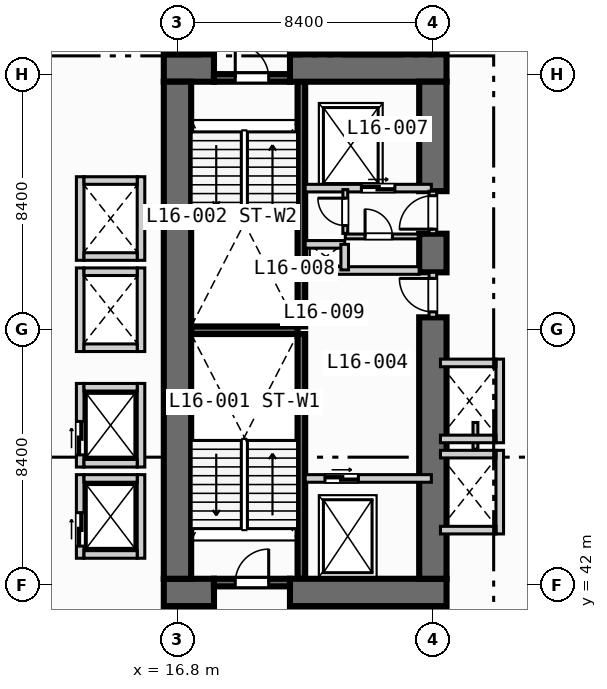
"""IFC4 building model, lengths in metres.
Left out: names, types, materials, properties, quantities, classifications, styles, units other than length and angle.
Written with IfcOpenShell. Run it as: python <this file> out.ifc"""

import sys

from ifc_helpers import new_model, si_unit, direction, frame, frame_2d, origin, place, context, subcontext, project, spatial, rectangle, extrude, element, fill, save


model = new_model("IFC4")
c1 = context("Model", 3, precision=1e-05, world=origin(), true_north=direction((0.0, 1.0)))
c2 = subcontext(c1, "Body", "Model", "MODEL_VIEW")
j1 = project(units=[si_unit("LENGTHUNIT", "METRE"), si_unit("PLANEANGLEUNIT", "RADIAN")], contexts=[c1])
p1 = place(None, origin())
s1 = spatial("IfcSite", under=j1, at=p1, CompositionType="ELEMENT")
p2 = place(p1, origin())
s2 = spatial("IfcBuilding", under=s1, at=p2, CompositionType="ELEMENT")
p3 = place(p2, frame((0.0, 0.0, 70.0)))
s3 = spatial("IfcBuildingStorey", under=s2, at=p3, CompositionType="ELEMENT", Elevation=70.0)
for number, where, z_axis, x_axis in (
    (1, (20.875, 42.2, 0.0), (0.0, 0.0, 1.0), (0.0, 1.0, 0.0)),
    (2, (20.875, 50.5, 0.0), (0.0, 0.0, 1.0), (0.0, 1.0, 0.0)),
):
    element("IfcWall", number, at=place(p3, frame(where, z_axis=z_axis, x_axis=x_axis)), inside=s3, PredefinedType="SOLIDWALL", context=c2, shape_type="SweptSolid", body=[
        extrude(rectangle(XDim=8.05, YDim=0.25, at=frame_2d((4.025, 0.0))), origin(), (0.0, 0.0, 1.0), 3.55),
    ])
p4 = place(p3, frame((17.25, 50.375, 0.0), z_axis=(0.0, 0.0, 1.0), x_axis=(1.0, 0.0, 0.0)))
e3 = element("IfcWall", 3, at=p4, inside=s3, PredefinedType="SOLIDWALL", context=c2, shape_type="SweptSolid", body=[
    extrude(rectangle(XDim=3.5, YDim=0.25, at=frame_2d((1.75, 0.0))), origin(), (0.0, 0.0, 1.0), 3.55),
])
p5 = place(p3, frame((16.35, 41.75, 0.0), z_axis=(0.0, 0.0, 1.0), x_axis=(1.0, 0.0, 0.0)))
e4 = element("IfcWall", 4, at=p5, inside=s3, PredefinedType="SHEAR", context=c2, shape_type="SweptSolid", body=[
    extrude(rectangle(XDim=1.65, YDim=0.9, at=frame_2d((0.825, 0.0))), origin(), (0.0, 0.0, 1.0), 3.55),
])
p6 = place(p3, frame((20.5, 41.75, 0.0), z_axis=(0.0, 0.0, 1.0), x_axis=(1.0, 0.0, 0.0)))
e5 = element("IfcWall", 5, at=p6, inside=s3, PredefinedType="SHEAR", context=c2, shape_type="SweptSolid", body=[
    extrude(rectangle(XDim=5.15, YDim=0.9, at=frame_2d((2.575, 0.0))), origin(), (0.0, 0.0, 1.0), 3.55),
])
p7 = place(p3, frame((16.35, 59.0, 0.0), z_axis=(0.0, 0.0, 1.0), x_axis=(1.0, 0.0, 0.0)))
e6 = element("IfcWall", 6, at=p7, inside=s3, PredefinedType="SHEAR", context=c2, shape_type="SweptSolid", body=[
    extrude(rectangle(XDim=1.65, YDim=0.9, at=frame_2d((0.825, 0.0))), origin(), (0.0, 0.0, 1.0), 3.55),
])
p8 = place(p3, frame((20.5, 59.0, 0.0), z_axis=(0.0, 0.0, 1.0), x_axis=(1.0, 0.0, 0.0)))
e7 = element("IfcWall", 7, at=p8, inside=s3, PredefinedType="SHEAR", context=c2, shape_type="SweptSolid", body=[
    extrude(rectangle(XDim=5.15, YDim=0.9, at=frame_2d((2.575, 0.0))), origin(), (0.0, 0.0, 1.0), 3.55),
])
p9 = place(p3, frame((16.8, 42.2, 0.0), z_axis=(0.0, 0.0, 1.0), x_axis=(0.0, 1.0, 0.0)))
e8 = element("IfcWall", 8, at=p9, inside=s3, PredefinedType="SHEAR", context=c2, shape_type="SweptSolid", body=[
    extrude(rectangle(XDim=16.35, YDim=0.9, at=frame_2d((8.175, 0.0))), origin(), (0.0, 0.0, 1.0), 3.55),
])
p10 = place(p3, frame((25.2, 42.2, 0.0), z_axis=(0.0, 0.0, 1.0), x_axis=(0.0, 1.0, 0.0)))
e9 = element("IfcWall", 9, at=p10, inside=s3, PredefinedType="SHEAR", context=c2, shape_type="SweptSolid", body=[
    extrude(rectangle(XDim=8.6, YDim=0.9, at=frame_2d((4.3, 0.0))), origin(), (0.0, 0.0, 1.0), 3.55),
])
p11 = place(p3, frame((25.2, 52.28, 0.0), z_axis=(0.0, 0.0, 1.0), x_axis=(0.0, 1.0, 0.0)))
e10 = element("IfcWall", 10, at=p11, inside=s3, PredefinedType="SHEAR", context=c2, shape_type="SweptSolid", body=[
    extrude(rectangle(XDim=1.27, YDim=0.9, at=frame_2d((0.635, 0.0))), origin(), (0.0, 0.0, 1.0), 3.55),
])
p12 = place(p3, frame((25.2, 54.95, 0.0), z_axis=(0.0, 0.0, 1.0), x_axis=(0.0, 1.0, 0.0)))
e11 = element("IfcWall", 11, at=p12, inside=s3, PredefinedType="SHEAR", context=c2, shape_type="SweptSolid", body=[
    extrude(rectangle(XDim=3.6, YDim=0.9, at=frame_2d((1.8, 0.0))), origin(), (0.0, 0.0, 1.0), 3.55),
])
p13 = place(p3, frame((18.0, 42.075, 0.0), z_axis=(0.0, 0.0, 1.0), x_axis=(1.0, 0.0, 0.0)))
e12 = element("IfcWall", 12, at=p13, inside=s3, PredefinedType="SOLIDWALL", context=c2, shape_type="SweptSolid", body=[
    extrude(rectangle(XDim=2.5, YDim=0.25, at=frame_2d((1.25, 0.0))), origin(), (0.0, 0.0, 1.0), 3.55),
])
p14 = place(p13, frame((0.7, 0.0, 0.0)))
e13 = element("IfcOpeningElement", 13, at=p14, cuts=e12, PredefinedType="OPENING", context=c2, shape_type="SweptSolid", body=[
    extrude(rectangle(XDim=1.1, YDim=2.15, at=frame_2d((0.55, 1.075))), frame((0.0, 0.135, 0.0), z_axis=(0.0, -1.0, 0.0), x_axis=(1.0, 0.0, 0.0)), (0.0, 0.0, 1.0), 0.27),
])
p15 = place(p3, frame((18.0, 58.675, 0.0), z_axis=(0.0, 0.0, 1.0), x_axis=(1.0, 0.0, 0.0)))
e14 = element("IfcWall", 14, at=p15, inside=s3, PredefinedType="SOLIDWALL", context=c2, shape_type="SweptSolid", body=[
    extrude(rectangle(XDim=2.5, YDim=0.25, at=frame_2d((1.25, 0.0))), origin(), (0.0, 0.0, 1.0), 3.55),
])
p16 = place(p15, frame((0.7, 0.0, 0.0)))
e15 = element("IfcOpeningElement", 15, at=p16, cuts=e14, PredefinedType="OPENING", context=c2, shape_type="SweptSolid", body=[
    extrude(rectangle(XDim=1.1, YDim=2.15, at=frame_2d((0.55, 1.075))), frame((0.0, 0.135, 0.0), z_axis=(0.0, -1.0, 0.0), x_axis=(1.0, 0.0, 0.0)), (0.0, 0.0, 1.0), 0.27),
])
p17 = place(p3, frame((21.0, 45.5, 0.0), z_axis=(0.0, 0.0, 1.0), x_axis=(1.0, 0.0, 0.0)))
e16 = element("IfcWall", 16, at=p17, inside=s3, PredefinedType="SOLIDWALL", context=c2, shape_type="SweptSolid", body=[
    extrude(rectangle(XDim=4.15, YDim=0.25, at=frame_2d((2.075, 0.0))), origin(), (0.0, 0.0, 1.0), 3.55),
])
p18 = place(p17, frame((0.65, 0.0, 0.0)))
e17 = element("IfcOpeningElement", 17, at=p18, cuts=e16, PredefinedType="OPENING", context=c2, shape_type="SweptSolid", body=[
    extrude(rectangle(XDim=1.1, YDim=2.15, at=frame_2d((0.55, 1.075))), frame((0.0, 0.135, 0.0), z_axis=(0.0, -1.0, 0.0), x_axis=(1.0, 0.0, 0.0)), (0.0, 0.0, 1.0), 0.27),
])
p19 = place(p3, frame((25.2, 50.8, 0.0), z_axis=(0.0, 0.0, 1.0), x_axis=(0.0, 1.0, 0.0)))
e18 = element("IfcWall", 18, at=p19, inside=s3, PredefinedType="SOLIDWALL", context=c2, shape_type="SweptSolid", body=[
    extrude(rectangle(XDim=1.48, YDim=0.25, at=frame_2d((0.74, 0.0))), origin(), (0.0, 0.0, 1.0), 3.55),
])
p20 = place(p19, frame((0.18, 0.0, 0.0)))
e19 = element("IfcOpeningElement", 19, at=p20, cuts=e18, PredefinedType="OPENING", context=c2, shape_type="SweptSolid", body=[
    extrude(rectangle(XDim=1.1, YDim=2.15, at=frame_2d((0.55, 1.075))), frame((0.0, 0.135, 0.0), z_axis=(0.0, -1.0, 0.0), x_axis=(1.0, 0.0, 0.0)), (0.0, 0.0, 1.0), 0.27),
])
p21 = place(p3, frame((21.0, 52.34, 0.0), z_axis=(0.0, 0.0, 1.0), x_axis=(1.0, 0.0, 0.0)))
e20 = element("IfcWall", 20, at=p21, inside=s3, PredefinedType="SOLIDWALL", context=c2, shape_type="SweptSolid", body=[
    extrude(rectangle(XDim=3.75, YDim=0.25, at=frame_2d((1.875, 0.0))), origin(), (0.0, 0.0, 1.0), 3.55),
])
p22 = place(p3, frame((21.0, 55.05, 0.0), z_axis=(0.0, 0.0, 1.0), x_axis=(1.0, 0.0, 0.0)))
e21 = element("IfcWall", 21, at=p22, inside=s3, PredefinedType="SOLIDWALL", context=c2, shape_type="SweptSolid", body=[
    extrude(rectangle(XDim=4.15, YDim=0.25, at=frame_2d((2.075, 0.0))), origin(), (0.0, 0.0, 1.0), 3.55),
])
p23 = place(p22, frame((1.85, 0.0, 0.0)))
e22 = element("IfcOpeningElement", 22, at=p23, cuts=e21, PredefinedType="OPENING", context=c2, shape_type="SweptSolid", body=[
    extrude(rectangle(XDim=1.1, YDim=2.15, at=frame_2d((0.55, 1.075))), frame((0.0, 0.135, 0.0), z_axis=(0.0, -1.0, 0.0), x_axis=(1.0, 0.0, 0.0)), (0.0, 0.0, 1.0), 0.27),
])
p24 = place(p3, frame((25.2, 53.55, 0.0), z_axis=(0.0, 0.0, 1.0), x_axis=(0.0, 1.0, 0.0)))
e23 = element("IfcWall", 23, at=p24, inside=s3, PredefinedType="SOLIDWALL", context=c2, shape_type="SweptSolid", body=[
    extrude(rectangle(XDim=1.4, YDim=0.25, at=frame_2d((0.7, 0.0))), origin(), (0.0, 0.0, 1.0), 3.55),
])
p25 = place(p24, frame((0.15, 0.0, 0.0)))
e24 = element("IfcOpeningElement", 24, at=p25, cuts=e23, PredefinedType="OPENING", context=c2, shape_type="SweptSolid", body=[
    extrude(rectangle(XDim=1.1, YDim=2.15, at=frame_2d((0.55, 1.075))), frame((0.0, 0.135, 0.0), z_axis=(0.0, -1.0, 0.0), x_axis=(1.0, 0.0, 0.0)), (0.0, 0.0, 1.0), 0.27),
])
p26 = place(p3, frame((21.0, 53.2, 0.0), z_axis=(0.0, 0.0, 1.0), x_axis=(1.0, 0.0, 0.0)))
e25 = element("IfcWall", 25, at=p26, inside=s3, PredefinedType="SOLIDWALL", context=c2, shape_type="SweptSolid", body=[
    extrude(rectangle(XDim=1.3, YDim=0.25, at=frame_2d((0.65, 0.0))), origin(), (0.0, 0.0, 1.0), 3.55),
])
p27 = place(p3, frame((22.3, 52.36, 0.0), z_axis=(0.0, 0.0, 1.0), x_axis=(0.0, 1.0, 0.0)))
e26 = element("IfcWall", 26, at=p27, inside=s3, PredefinedType="SOLIDWALL", context=c2, shape_type="SweptSolid", body=[
    extrude(rectangle(XDim=0.84, YDim=0.25, at=frame_2d((0.42, 0.0))), origin(), (0.0, 0.0, 1.0), 3.55),
])
p28 = place(p3, frame((22.32, 53.56, 0.0), z_axis=(0.0, 0.0, 1.0), x_axis=(0.0, 1.0, 0.0)))
e27 = element("IfcWall", 27, at=p28, inside=s3, PredefinedType="PARTITIONING", context=c2, shape_type="SweptSolid", body=[
    extrude(rectangle(XDim=1.44, YDim=0.16, at=frame_2d((0.72, 0.0))), origin(), (0.0, 0.0, 1.0), 3.55),
])
p29 = place(p28, frame((0.26, 0.0, 0.0)))
e28 = element("IfcOpeningElement", 28, at=p29, cuts=e27, PredefinedType="OPENING", context=c2, shape_type="SweptSolid", body=[
    extrude(rectangle(XDim=0.9, YDim=2.1, at=frame_2d((0.45, 1.05))), frame((0.0, 0.09, 0.0), z_axis=(0.0, -1.0, 0.0), x_axis=(1.0, 0.0, 0.0)), (0.0, 0.0, 1.0), 0.18),
])
p30 = place(p3, frame((22.32, 53.46, 0.0), z_axis=(0.0, 0.0, 1.0), x_axis=(1.0, 0.0, 0.0)))
e29 = element("IfcWall", 29, at=p30, inside=s3, PredefinedType="PARTITIONING", context=c2, shape_type="SweptSolid", body=[
    extrude(rectangle(XDim=2.4, YDim=0.16, at=frame_2d((1.2, 0.0))), origin(), (0.0, 0.0, 1.0), 3.55),
])
p31 = place(p30, frame((0.65, 0.0, 0.0)))
e30 = element("IfcOpeningElement", 30, at=p31, cuts=e29, PredefinedType="OPENING", context=c2, shape_type="SweptSolid", body=[
    extrude(rectangle(XDim=0.9, YDim=2.1, at=frame_2d((0.45, 1.05))), frame((0.0, 0.09, 0.0), z_axis=(0.0, -1.0, 0.0), x_axis=(1.0, 0.0, 0.0)), (0.0, 0.0, 1.0), 0.18),
])
p32 = place(p3, frame((13.6, 42.875, 0.0), z_axis=(0.0, 0.0, 1.0), x_axis=(0.0, 1.0, 0.0)))
e31 = element("IfcWall", 31, at=p32, inside=s3, PredefinedType="SOLIDWALL", context=c2, shape_type="SweptSolid", body=[
    extrude(rectangle(XDim=2.75, YDim=0.25, at=frame_2d((1.375, 0.0))), origin(), (0.0, 0.0, 1.0), 3.55),
])
p33 = place(p32, frame((0.4, 0.0, 0.0)))
e32 = element("IfcOpeningElement", 32, at=p33, cuts=e31, PredefinedType="OPENING", context=c2, shape_type="SweptSolid", body=[
    extrude(rectangle(XDim=1.1, YDim=2.15, at=frame_2d((0.55, 1.075))), frame((0.0, 0.135, 0.0), z_axis=(0.0, -1.0, 0.0), x_axis=(1.0, 0.0, 0.0)), (0.0, 0.0, 1.0), 0.27),
])
p34 = place(p3, frame((15.6, 42.875, 0.0), z_axis=(0.0, 0.0, 1.0), x_axis=(0.0, 1.0, 0.0)))
e33 = element("IfcWall", 33, at=p34, inside=s3, PredefinedType="SOLIDWALL", context=c2, shape_type="SweptSolid", body=[
    extrude(rectangle(XDim=2.75, YDim=0.25, at=frame_2d((1.375, 0.0))), origin(), (0.0, 0.0, 1.0), 3.55),
])
for number, where, z_axis, x_axis in (
    (34, (13.725, 43.0, 0.0), (0.0, 0.0, 1.0), (1.0, 0.0, 0.0)),
    (35, (13.725, 45.5, 0.0), (0.0, 0.0, 1.0), (1.0, 0.0, 0.0)),
):
    element("IfcWall", number, at=place(p3, frame(where, z_axis=z_axis, x_axis=x_axis)), inside=s3, PredefinedType="SOLIDWALL", context=c2, shape_type="SweptSolid", body=[
        extrude(rectangle(XDim=1.75, YDim=0.25, at=frame_2d((0.875, 0.0))), origin(), (0.0, 0.0, 1.0), 3.55),
    ])
p35 = place(p3, frame((13.6, 45.875, 0.0), z_axis=(0.0, 0.0, 1.0), x_axis=(0.0, 1.0, 0.0)))
e36 = element("IfcWall", 36, at=p35, inside=s3, PredefinedType="SOLIDWALL", context=c2, shape_type="SweptSolid", body=[
    extrude(rectangle(XDim=2.75, YDim=0.25, at=frame_2d((1.375, 0.0))), origin(), (0.0, 0.0, 1.0), 3.55),
])
p36 = place(p35, frame((0.4, 0.0, 0.0)))
e37 = element("IfcOpeningElement", 37, at=p36, cuts=e36, PredefinedType="OPENING", context=c2, shape_type="SweptSolid", body=[
    extrude(rectangle(XDim=1.1, YDim=2.15, at=frame_2d((0.55, 1.075))), frame((0.0, 0.135, 0.0), z_axis=(0.0, -1.0, 0.0), x_axis=(1.0, 0.0, 0.0)), (0.0, 0.0, 1.0), 0.27),
])
p37 = place(p3, frame((15.6, 45.875, 0.0), z_axis=(0.0, 0.0, 1.0), x_axis=(0.0, 1.0, 0.0)))
e38 = element("IfcWall", 38, at=p37, inside=s3, PredefinedType="SOLIDWALL", context=c2, shape_type="SweptSolid", body=[
    extrude(rectangle(XDim=2.75, YDim=0.25, at=frame_2d((1.375, 0.0))), origin(), (0.0, 0.0, 1.0), 3.55),
])
for number, where, z_axis, x_axis in (
    (39, (13.725, 46.0, 0.0), (0.0, 0.0, 1.0), (1.0, 0.0, 0.0)),
    (40, (13.725, 48.5, 0.0), (0.0, 0.0, 1.0), (1.0, 0.0, 0.0)),
):
    element("IfcWall", number, at=place(p3, frame(where, z_axis=z_axis, x_axis=x_axis)), inside=s3, PredefinedType="SOLIDWALL", context=c2, shape_type="SweptSolid", body=[
        extrude(rectangle(XDim=1.75, YDim=0.25, at=frame_2d((0.875, 0.0))), origin(), (0.0, 0.0, 1.0), 3.55),
    ])
for number, where, z_axis, x_axis in (
    (41, (13.6, 49.675, 0.0), (0.0, 0.0, 1.0), (0.0, 1.0, 0.0)),
    (42, (15.6, 49.675, 0.0), (0.0, 0.0, 1.0), (0.0, 1.0, 0.0)),
):
    element("IfcWall", number, at=place(p3, frame(where, z_axis=z_axis, x_axis=x_axis)), inside=s3, PredefinedType="SOLIDWALL", context=c2, shape_type="SweptSolid", body=[
        extrude(rectangle(XDim=2.75, YDim=0.25, at=frame_2d((1.375, 0.0))), origin(), (0.0, 0.0, 1.0), 3.55),
    ])
for number, where, z_axis, x_axis in (
    (43, (13.725, 49.8, 0.0), (0.0, 0.0, 1.0), (1.0, 0.0, 0.0)),
    (44, (13.725, 52.3, 0.0), (0.0, 0.0, 1.0), (1.0, 0.0, 0.0)),
):
    element("IfcWall", number, at=place(p3, frame(where, z_axis=z_axis, x_axis=x_axis)), inside=s3, PredefinedType="SOLIDWALL", context=c2, shape_type="SweptSolid", body=[
        extrude(rectangle(XDim=1.75, YDim=0.25, at=frame_2d((0.875, 0.0))), origin(), (0.0, 0.0, 1.0), 3.55),
    ])
for number, where, z_axis, x_axis in (
    (45, (13.6, 52.675, 0.0), (0.0, 0.0, 1.0), (0.0, 1.0, 0.0)),
    (46, (15.6, 52.675, 0.0), (0.0, 0.0, 1.0), (0.0, 1.0, 0.0)),
):
    element("IfcWall", number, at=place(p3, frame(where, z_axis=z_axis, x_axis=x_axis)), inside=s3, PredefinedType="SOLIDWALL", context=c2, shape_type="SweptSolid", body=[
        extrude(rectangle(XDim=2.75, YDim=0.25, at=frame_2d((1.375, 0.0))), origin(), (0.0, 0.0, 1.0), 3.55),
    ])
for number, where, z_axis, x_axis in (
    (47, (13.725, 52.8, 0.0), (0.0, 0.0, 1.0), (1.0, 0.0, 0.0)),
    (48, (13.725, 55.3, 0.0), (0.0, 0.0, 1.0), (1.0, 0.0, 0.0)),
):
    element("IfcWall", number, at=place(p3, frame(where, z_axis=z_axis, x_axis=x_axis)), inside=s3, PredefinedType="SOLIDWALL", context=c2, shape_type="SweptSolid", body=[
        extrude(rectangle(XDim=1.75, YDim=0.25, at=frame_2d((0.875, 0.0))), origin(), (0.0, 0.0, 1.0), 3.55),
    ])
p38 = place(p3, frame((27.4, 43.675, 0.0), z_axis=(0.0, 0.0, 1.0), x_axis=(0.0, 1.0, 0.0)))
e49 = element("IfcWall", 49, at=p38, inside=s3, PredefinedType="SOLIDWALL", context=c2, shape_type="SweptSolid", body=[
    extrude(rectangle(XDim=2.75, YDim=0.25, at=frame_2d((1.375, 0.0))), origin(), (0.0, 0.0, 1.0), 3.55),
])
for number, where, z_axis, x_axis in (
    (50, (25.45, 43.8, 0.0), (0.0, 0.0, 1.0), (1.0, 0.0, 0.0)),
    (51, (25.45, 46.3, 0.0), (0.0, 0.0, 1.0), (1.0, 0.0, 0.0)),
):
    element("IfcWall", number, at=place(p3, frame(where, z_axis=z_axis, x_axis=x_axis)), inside=s3, PredefinedType="SOLIDWALL", context=c2, shape_type="SweptSolid", body=[
        extrude(rectangle(XDim=1.825, YDim=0.25, at=frame_2d((0.913, 0.0))), origin(), (0.0, 0.0, 1.0), 3.55),
    ])
p39 = place(p3, frame((26.6, 46.46, 0.0), z_axis=(0.0, 0.0, 1.0), x_axis=(0.0, 1.0, 0.0)))
e52 = element("IfcWall", 52, at=p39, inside=s3, PredefinedType="PARTITIONING", context=c2, shape_type="SweptSolid", body=[
    extrude(rectangle(XDim=0.88, YDim=0.16, at=frame_2d((0.44, 0.0))), origin(), (0.0, 0.0, 1.0), 3.55),
])
p40 = place(p3, frame((27.4, 46.675, 0.0), z_axis=(0.0, 0.0, 1.0), x_axis=(0.0, 1.0, 0.0)))
e53 = element("IfcWall", 53, at=p40, inside=s3, PredefinedType="SOLIDWALL", context=c2, shape_type="SweptSolid", body=[
    extrude(rectangle(XDim=2.75, YDim=0.25, at=frame_2d((1.375, 0.0))), origin(), (0.0, 0.0, 1.0), 3.55),
])
for number, where, z_axis, x_axis in (
    (54, (25.45, 46.8, 0.0), (0.0, 0.0, 1.0), (1.0, 0.0, 0.0)),
    (55, (25.45, 49.3, 0.0), (0.0, 0.0, 1.0), (1.0, 0.0, 0.0)),
):
    element("IfcWall", number, at=place(p3, frame(where, z_axis=z_axis, x_axis=x_axis)), inside=s3, PredefinedType="SOLIDWALL", context=c2, shape_type="SweptSolid", body=[
        extrude(rectangle(XDim=1.825, YDim=0.25, at=frame_2d((0.913, 0.0))), origin(), (0.0, 0.0, 1.0), 3.55),
    ])
p41 = place(p14, origin())
e56 = element("IfcDoor", 56, at=p41, inside=s3, OperationType="SINGLE_SWING_RIGHT", PredefinedType="DOOR", context=c2, shape_type="SweptSolid", body=[
    extrude(rectangle(XDim=1.1, YDim=2.15, at=frame_2d((0.55, 1.075))), frame((0.0, 0.025, 0.0), z_axis=(0.0, -1.0, 0.0), x_axis=(1.0, 0.0, 0.0)), (0.0, 0.0, 1.0), 0.05),
])
fill(e13, e56)
p42 = place(p16, origin())
e57 = element("IfcDoor", 57, at=p42, inside=s3, OperationType="SINGLE_SWING_LEFT", PredefinedType="DOOR", context=c2, shape_type="SweptSolid", body=[
    extrude(rectangle(XDim=1.1, YDim=2.15, at=frame_2d((0.55, 1.075))), frame((0.0, 0.025, 0.0), z_axis=(0.0, -1.0, 0.0), x_axis=(1.0, 0.0, 0.0)), (0.0, 0.0, 1.0), 0.05),
])
fill(e15, e57)
p43 = place(p18, origin())
e58 = element("IfcDoor", 58, at=p43, inside=s3, OperationType="SLIDING_TO_LEFT", PredefinedType="DOOR", context=c2, shape_type="SweptSolid", body=[
    extrude(rectangle(XDim=1.1, YDim=2.15, at=frame_2d((0.55, 1.075))), frame((0.0, 0.025, 0.0), z_axis=(0.0, -1.0, 0.0), x_axis=(1.0, 0.0, 0.0)), (0.0, 0.0, 1.0), 0.05),
])
fill(e17, e58)
p44 = place(p20, origin())
e59 = element("IfcDoor", 59, at=p44, inside=s3, OperationType="SINGLE_SWING_RIGHT", PredefinedType="DOOR", context=c2, shape_type="SweptSolid", body=[
    extrude(rectangle(XDim=1.1, YDim=2.15, at=frame_2d((0.55, 1.075))), frame((0.0, 0.025, 0.0), z_axis=(0.0, -1.0, 0.0), x_axis=(1.0, 0.0, 0.0)), (0.0, 0.0, 1.0), 0.05),
])
fill(e19, e59)
p45 = place(p23, origin())
e60 = element("IfcDoor", 60, at=p45, inside=s3, OperationType="SLIDING_TO_LEFT", PredefinedType="DOOR", context=c2, shape_type="SweptSolid", body=[
    extrude(rectangle(XDim=1.1, YDim=2.15, at=frame_2d((0.55, 1.075))), frame((0.0, 0.025, 0.0), z_axis=(0.0, -1.0, 0.0), x_axis=(1.0, 0.0, 0.0)), (0.0, 0.0, 1.0), 0.05),
])
fill(e22, e60)
p46 = place(p25, origin())
e61 = element("IfcDoor", 61, at=p46, inside=s3, OperationType="SINGLE_SWING_LEFT", PredefinedType="DOOR", context=c2, shape_type="SweptSolid", body=[
    extrude(rectangle(XDim=1.1, YDim=2.15, at=frame_2d((0.55, 1.075))), frame((0.0, 0.025, 0.0), z_axis=(0.0, -1.0, 0.0), x_axis=(1.0, 0.0, 0.0)), (0.0, 0.0, 1.0), 0.05),
])
fill(e24, e61)
p47 = place(p29, origin())
e62 = element("IfcDoor", 62, at=p47, inside=s3, OperationType="SINGLE_SWING_RIGHT", PredefinedType="DOOR", context=c2, shape_type="SweptSolid", body=[
    extrude(rectangle(XDim=0.9, YDim=2.1, at=frame_2d((0.45, 1.05))), frame((0.0, 0.025, 0.0), z_axis=(0.0, -1.0, 0.0), x_axis=(1.0, 0.0, 0.0)), (0.0, 0.0, 1.0), 0.05),
])
fill(e28, e62)
p48 = place(p31, origin())
e63 = element("IfcDoor", 63, at=p48, inside=s3, OperationType="SINGLE_SWING_LEFT", PredefinedType="DOOR", context=c2, shape_type="SweptSolid", body=[
    extrude(rectangle(XDim=0.9, YDim=2.1, at=frame_2d((0.45, 1.05))), frame((0.0, 0.025, 0.0), z_axis=(0.0, -1.0, 0.0), x_axis=(1.0, 0.0, 0.0)), (0.0, 0.0, 1.0), 0.05),
])
fill(e30, e63)
p49 = place(p33, origin())
e64 = element("IfcDoor", 64, at=p49, inside=s3, OperationType="SLIDING_TO_LEFT", PredefinedType="DOOR", context=c2, shape_type="SweptSolid", body=[
    extrude(rectangle(XDim=1.1, YDim=2.15, at=frame_2d((0.55, 1.075))), frame((0.0, 0.025, 0.0), z_axis=(0.0, -1.0, 0.0), x_axis=(1.0, 0.0, 0.0)), (0.0, 0.0, 1.0), 0.05),
])
fill(e32, e64)
p50 = place(p36, origin())
e65 = element("IfcDoor", 65, at=p50, inside=s3, OperationType="SLIDING_TO_LEFT", PredefinedType="DOOR", context=c2, shape_type="SweptSolid", body=[
    extrude(rectangle(XDim=1.1, YDim=2.15, at=frame_2d((0.55, 1.075))), frame((0.0, 0.025, 0.0), z_axis=(0.0, -1.0, 0.0), x_axis=(1.0, 0.0, 0.0)), (0.0, 0.0, 1.0), 0.05),
])
fill(e37, e65)
save(model, sys.argv[1])
